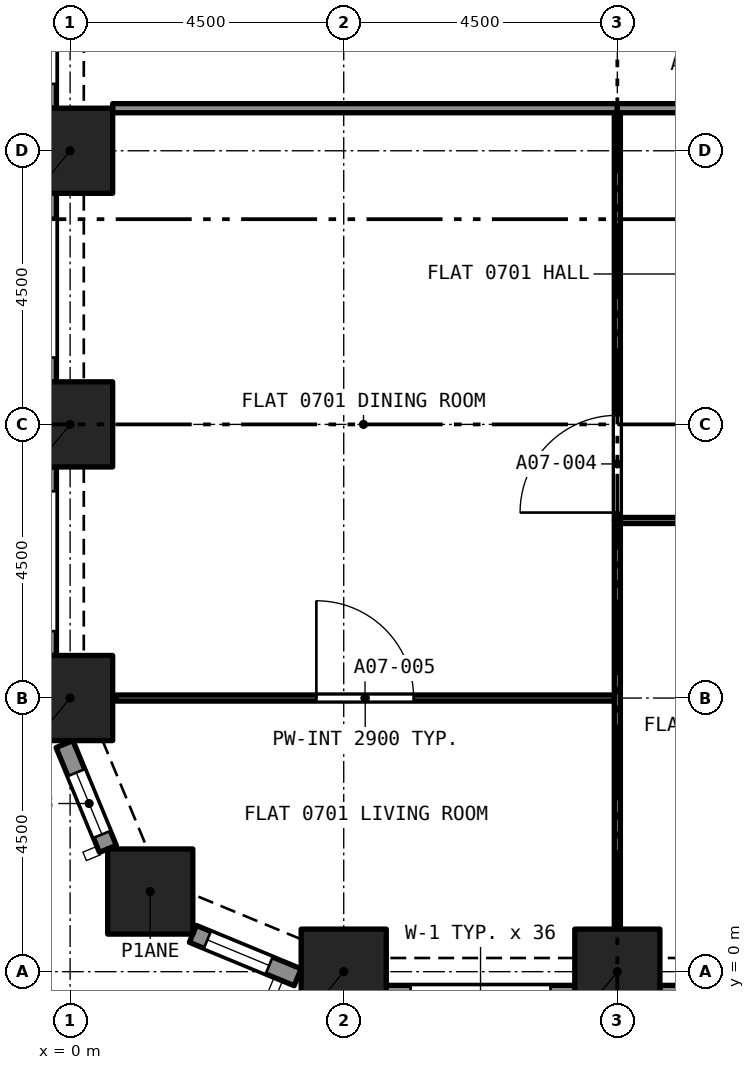
"""IFC4 building model, lengths in metres.
Left out: names, types, materials, properties, quantities, classifications, styles, units other than length and angle.
Written with IfcOpenShell. Run it as: python <this file> out.ifc"""

import sys

from ifc_helpers import new_model, si_unit, direction, frame, frame_2d, origin, origin_2d, place, context, subcontext, project, spatial, rectangle, extrude, element, fill, save


model = new_model("IFC4")
c1 = context("Model", 3, precision=1e-05, world=origin(), true_north=direction((0.0, 1.0)))
c2 = subcontext(c1, "Body", "Model", "MODEL_VIEW")
j1 = project(units=[si_unit("LENGTHUNIT", "METRE"), si_unit("PLANEANGLEUNIT", "RADIAN")], contexts=[c1])
p1 = place(None, origin())
s1 = spatial("IfcSite", under=j1, at=p1, CompositionType="ELEMENT")
p2 = place(p1, origin())
s2 = spatial("IfcBuilding", under=s1, at=p2, CompositionType="ELEMENT")
p3 = place(p2, frame((0.0, 0.0, 33.6)))
s3 = spatial("IfcBuildingStorey", under=s2, at=p3, CompositionType="ELEMENT", Elevation=33.6)
for number, where, z_axis, x_axis in (
    (1, (4.5, 0.0, 0.0), (0.0, 0.0, 1.0), (1.0, 0.0, 0.0)),
    (2, (9.0, 0.0, 0.0), (0.0, 0.0, 1.0), (1.0, 0.0, 0.0)),
    (3, (1.318, 1.318, 0.0), (0.0, 0.0, 1.0), (1.0, 0.0, 0.0)),
    (4, (0.0, 4.5, 0.0), (0.0, 0.0, 1.0), (1.0, 0.0, 0.0)),
    (5, (0.0, 9.0, 0.0), (0.0, 0.0, 1.0), (1.0, 0.0, 0.0)),
    (6, (0.0, 13.5, 0.0), (0.0, 0.0, 1.0), (1.0, 0.0, 0.0)),
):
    element("IfcColumn", number, at=place(p3, frame(where, z_axis=z_axis, x_axis=x_axis)), inside=s3, PredefinedType="COLUMN", context=c2, shape_type="SweptSolid", body=[
        extrude(rectangle(XDim=1.4, YDim=1.4, at=origin_2d()), origin(), (0.0, 0.0, 1.0), 3.2),
    ])
p4 = place(p3, frame((0.622, 2.02, 0.0), z_axis=(0.0, 0.0, 1.0), x_axis=(-0.38262540684, 0.923903565336, 0.0)))
e7 = element("IfcWall", 7, at=p4, inside=s3, PredefinedType="SOLIDWALL", context=c2, shape_type="SweptSolid", body=[
    extrude(rectangle(XDim=1.865, YDim=0.3, at=frame_2d((0.933, 0.0))), origin(), (0.0, 0.0, 1.0), 3.2),
])
p5 = place(p4, frame((0.258, 0.0, 0.45)))
e8 = element("IfcOpeningElement", 8, at=p5, cuts=e7, PredefinedType="OPENING", context=c2, shape_type="SweptSolid", body=[
    extrude(rectangle(XDim=1.1, YDim=1.95, at=frame_2d((0.55, 0.975))), frame((0.0, 0.16, 0.0), z_axis=(0.0, -1.0, 0.0), x_axis=(1.0, 0.0, 0.0)), (0.0, 0.0, 1.0), 0.32),
])
p6 = place(p3, frame((3.743, -0.092, 0.0), z_axis=(0.0, 0.0, 1.0), x_axis=(-0.923857286003, 0.382737135771, 0.0)))
e9 = element("IfcWall", 9, at=p6, inside=s3, PredefinedType="SOLIDWALL", context=c2, shape_type="SweptSolid", body=[
    extrude(rectangle(XDim=1.865, YDim=0.3, at=frame_2d((0.933, 0.0))), origin(), (0.0, 0.0, 1.0), 3.2),
])
p7 = place(p6, frame((0.508, 0.0, 0.45)))
e10 = element("IfcOpeningElement", 10, at=p7, cuts=e9, PredefinedType="OPENING", context=c2, shape_type="SweptSolid", body=[
    extrude(rectangle(XDim=1.1, YDim=1.95, at=frame_2d((0.55, 0.975))), frame((0.0, 0.16, 0.0), z_axis=(0.0, -1.0, 0.0), x_axis=(1.0, 0.0, 0.0)), (0.0, 0.0, 1.0), 0.32),
])
p8 = place(p3, frame((8.3, -0.375, 0.0), z_axis=(0.0, 0.0, 1.0), x_axis=(-1.0, 0.0, 0.0)))
e11 = element("IfcWall", 11, at=p8, inside=s3, PredefinedType="SOLIDWALL", context=c2, shape_type="SweptSolid", body=[
    extrude(rectangle(XDim=3.1, YDim=0.3, at=frame_2d((1.55, 0.0))), origin(), (0.0, 0.0, 1.0), 3.2),
])
p9 = place(p8, frame((0.4, 0.0, 0.45)))
e12 = element("IfcOpeningElement", 12, at=p9, cuts=e11, PredefinedType="OPENING", context=c2, shape_type="SweptSolid", body=[
    extrude(rectangle(XDim=2.3, YDim=1.95, at=frame_2d((1.15, 0.975))), frame((0.0, 0.16, 0.0), z_axis=(0.0, -1.0, 0.0), x_axis=(1.0, 0.0, 0.0)), (0.0, 0.0, 1.0), 0.32),
])
p10 = place(p3, frame((12.8, -0.375, 0.0), z_axis=(0.0, 0.0, 1.0), x_axis=(-1.0, 0.0, 0.0)))
e13 = element("IfcWall", 13, at=p10, inside=s3, PredefinedType="SOLIDWALL", context=c2, shape_type="SweptSolid", body=[
    extrude(rectangle(XDim=3.1, YDim=0.3, at=frame_2d((1.55, 0.0))), origin(), (0.0, 0.0, 1.0), 3.2),
])
p11 = place(p10, frame((0.4, 0.0, 0.45)))
e14 = element("IfcOpeningElement", 14, at=p11, cuts=e13, PredefinedType="OPENING", context=c2, shape_type="SweptSolid", body=[
    extrude(rectangle(XDim=2.3, YDim=1.95, at=frame_2d((1.15, 0.975))), frame((0.0, 0.16, 0.0), z_axis=(0.0, -1.0, 0.0), x_axis=(1.0, 0.0, 0.0)), (0.0, 0.0, 1.0), 0.32),
])
p12 = place(p3, frame((-0.375, 14.2, 0.0), z_axis=(0.0, 0.0, 1.0), x_axis=(0.0, 1.0, 0.0)))
e15 = element("IfcWall", 15, at=p12, inside=s3, PredefinedType="SOLIDWALL", context=c2, shape_type="SweptSolid", body=[
    extrude(rectangle(XDim=3.1, YDim=0.3, at=frame_2d((1.55, 0.0))), origin(), (0.0, 0.0, 1.0), 3.2),
])
p13 = place(p12, frame((0.4, 0.0, 0.45)))
e16 = element("IfcOpeningElement", 16, at=p13, cuts=e15, PredefinedType="OPENING", context=c2, shape_type="SweptSolid", body=[
    extrude(rectangle(XDim=2.3, YDim=1.95, at=frame_2d((1.15, 0.975))), frame((0.0, 0.16, 0.0), z_axis=(0.0, -1.0, 0.0), x_axis=(1.0, 0.0, 0.0)), (0.0, 0.0, 1.0), 0.32),
])
p14 = place(p3, frame((-0.375, 9.7, 0.0), z_axis=(0.0, 0.0, 1.0), x_axis=(0.0, 1.0, 0.0)))
e17 = element("IfcWall", 17, at=p14, inside=s3, PredefinedType="SOLIDWALL", context=c2, shape_type="SweptSolid", body=[
    extrude(rectangle(XDim=3.1, YDim=0.3, at=frame_2d((1.55, 0.0))), origin(), (0.0, 0.0, 1.0), 3.2),
])
p15 = place(p14, frame((0.4, 0.0, 0.45)))
e18 = element("IfcOpeningElement", 18, at=p15, cuts=e17, PredefinedType="OPENING", context=c2, shape_type="SweptSolid", body=[
    extrude(rectangle(XDim=2.3, YDim=1.95, at=frame_2d((1.15, 0.975))), frame((0.0, 0.16, 0.0), z_axis=(0.0, -1.0, 0.0), x_axis=(1.0, 0.0, 0.0)), (0.0, 0.0, 1.0), 0.32),
])
p16 = place(p3, frame((-0.375, 5.2, 0.0), z_axis=(0.0, 0.0, 1.0), x_axis=(0.0, 1.0, 0.0)))
e19 = element("IfcWall", 19, at=p16, inside=s3, PredefinedType="SOLIDWALL", context=c2, shape_type="SweptSolid", body=[
    extrude(rectangle(XDim=3.1, YDim=0.3, at=frame_2d((1.55, 0.0))), origin(), (0.0, 0.0, 1.0), 3.2),
])
p17 = place(p16, frame((0.4, 0.0, 0.45)))
e20 = element("IfcOpeningElement", 20, at=p17, cuts=e19, PredefinedType="OPENING", context=c2, shape_type="SweptSolid", body=[
    extrude(rectangle(XDim=2.3, YDim=1.95, at=frame_2d((1.15, 0.975))), frame((0.0, 0.16, 0.0), z_axis=(0.0, -1.0, 0.0), x_axis=(1.0, 0.0, 0.0)), (0.0, 0.0, 1.0), 0.32),
])
p18 = place(p3, frame((13.5, 7.42, 0.0), z_axis=(0.0, 0.0, 1.0), x_axis=(-1.0, 0.0, 0.0)))
e21 = element("IfcWall", 21, at=p18, inside=s3, PredefinedType="PARTITIONING", context=c2, shape_type="SweptSolid", body=[
    extrude(rectangle(XDim=4.45, YDim=0.1, at=frame_2d((2.225, 0.0))), origin(), (0.0, 0.0, 1.0), 2.9),
])
p19 = place(p18, frame((1.8, 0.0, 0.0)))
e22 = element("IfcOpeningElement", 22, at=p19, cuts=e21, PredefinedType="OPENING", context=c2, shape_type="SweptSolid", body=[
    extrude(rectangle(XDim=0.9, YDim=2.1, at=frame_2d((0.45, 1.05))), frame((0.0, 0.06, 0.0), z_axis=(0.0, -1.0, 0.0), x_axis=(1.0, 0.0, 0.0)), (0.0, 0.0, 1.0), 0.12),
])
p20 = place(p3, frame((9.0, 0.7, 0.0), z_axis=(0.0, 0.0, 1.0), x_axis=(0.0, 1.0, 0.0)))
e23 = element("IfcWall", 23, at=p20, inside=s3, PredefinedType="PARTITIONING", context=c2, shape_type="SweptSolid", body=[
    extrude(rectangle(XDim=6.72, YDim=0.1, at=frame_2d((3.36, 0.0))), origin(), (0.0, 0.0, 1.0), 2.9),
])
p21 = place(p3, frame((9.0, 7.42, 0.0), z_axis=(0.0, 0.0, 1.0), x_axis=(0.0, 1.0, 0.0)))
e24 = element("IfcWall", 24, at=p21, inside=s3, PredefinedType="PARTITIONING", context=c2, shape_type="SweptSolid", body=[
    extrude(rectangle(XDim=6.705, YDim=0.1, at=frame_2d((3.353, 0.0))), origin(), (0.0, 0.0, 1.0), 2.9),
])
p22 = place(p21, frame((0.13, 0.0, 0.0)))
e25 = element("IfcOpeningElement", 25, at=p22, cuts=e24, PredefinedType="OPENING", context=c2, shape_type="SweptSolid", body=[
    extrude(rectangle(XDim=1.6, YDim=2.1, at=frame_2d((0.8, 1.05))), frame((0.0, 0.06, 0.0), z_axis=(0.0, -1.0, 0.0), x_axis=(1.0, 0.0, 0.0)), (0.0, 0.0, 1.0), 0.12),
])
p23 = place(p3, frame((0.758, 4.5, 0.0), z_axis=(0.0, 0.0, 1.0), x_axis=(1.0, 0.0, 0.0)))
e26 = element("IfcWall", 26, at=p23, inside=s3, PredefinedType="PARTITIONING", context=c2, shape_type="SweptSolid", body=[
    extrude(rectangle(XDim=8.192, YDim=0.1, at=frame_2d((4.096, 0.0))), origin(), (0.0, 0.0, 1.0), 2.9),
])
p24 = place(p23, frame((3.292, 0.0, 0.0)))
e27 = element("IfcOpeningElement", 27, at=p24, cuts=e26, PredefinedType="OPENING", context=c2, shape_type="SweptSolid", body=[
    extrude(rectangle(XDim=1.6, YDim=2.1, at=frame_2d((0.8, 1.05))), frame((0.0, 0.06, 0.0), z_axis=(0.0, -1.0, 0.0), x_axis=(1.0, 0.0, 0.0)), (0.0, 0.0, 1.0), 0.12),
])
p25 = place(p3, frame((0.7, 14.2, 0.0), z_axis=(0.0, 0.0, 1.0), x_axis=(1.0, 0.0, 0.0)))
e28 = element("IfcWall", 28, at=p25, inside=s3, PredefinedType="PARTITIONING", context=c2, shape_type="SweptSolid", body=[
    extrude(rectangle(XDim=8.3, YDim=0.15, at=frame_2d((4.15, 0.0))), origin(), (0.0, 0.0, 1.0), 2.9),
])
p26 = place(p3, frame((11.925, 14.2, 0.0), z_axis=(0.0, 0.0, 1.0), x_axis=(-1.0, 0.0, 0.0)))
e29 = element("IfcWall", 29, at=p26, inside=s3, PredefinedType="PARTITIONING", context=c2, shape_type="SweptSolid", body=[
    extrude(rectangle(XDim=2.925, YDim=0.15, at=frame_2d((1.462, 0.0))), origin(), (0.0, 0.0, 1.0), 2.9),
])
p27 = place(p26, frame((0.175, 0.0, 0.0)))
e30 = element("IfcOpeningElement", 30, at=p27, cuts=e29, PredefinedType="OPENING", context=c2, shape_type="SweptSolid", body=[
    extrude(rectangle(XDim=1.0, YDim=2.1, at=frame_2d((0.5, 1.05))), frame((0.0, 0.085, 0.0), z_axis=(0.0, -1.0, 0.0), x_axis=(1.0, 0.0, 0.0)), (0.0, 0.0, 1.0), 0.17),
])
p28 = place(p5, origin())
e31 = element("IfcWindow", 31, at=p28, inside=s3, PartitioningType="SINGLE_PANEL", PredefinedType="WINDOW", context=c2, shape_type="SweptSolid", body=[
    extrude(rectangle(XDim=1.1, YDim=1.95, at=frame_2d((0.55, 0.975))), frame((0.0, 0.03, 0.0), z_axis=(0.0, -1.0, 0.0), x_axis=(1.0, 0.0, 0.0)), (0.0, 0.0, 1.0), 0.06),
])
fill(e8, e31)
p29 = place(p7, origin())
e32 = element("IfcWindow", 32, at=p29, inside=s3, PartitioningType="SINGLE_PANEL", PredefinedType="WINDOW", context=c2, shape_type="SweptSolid", body=[
    extrude(rectangle(XDim=1.1, YDim=1.95, at=frame_2d((0.55, 0.975))), frame((0.0, 0.03, 0.0), z_axis=(0.0, -1.0, 0.0), x_axis=(1.0, 0.0, 0.0)), (0.0, 0.0, 1.0), 0.06),
])
fill(e10, e32)
p30 = place(p22, origin())
e33 = element("IfcDoor", 33, at=p30, inside=s3, OperationType="SINGLE_SWING_LEFT", PredefinedType="DOOR", context=c2, shape_type="SweptSolid", body=[
    extrude(rectangle(XDim=1.6, YDim=2.1, at=frame_2d((0.8, 1.05))), frame((0.0, 0.025, 0.0), z_axis=(0.0, -1.0, 0.0), x_axis=(1.0, 0.0, 0.0)), (0.0, 0.0, 1.0), 0.05),
])
fill(e25, e33)
p31 = place(p24, origin())
e34 = element("IfcDoor", 34, at=p31, inside=s3, OperationType="SINGLE_SWING_LEFT", PredefinedType="DOOR", context=c2, shape_type="SweptSolid", body=[
    extrude(rectangle(XDim=1.6, YDim=2.1, at=frame_2d((0.8, 1.05))), frame((0.0, 0.025, 0.0), z_axis=(0.0, -1.0, 0.0), x_axis=(1.0, 0.0, 0.0)), (0.0, 0.0, 1.0), 0.05),
])
fill(e27, e34)
save(model, sys.argv[1])
